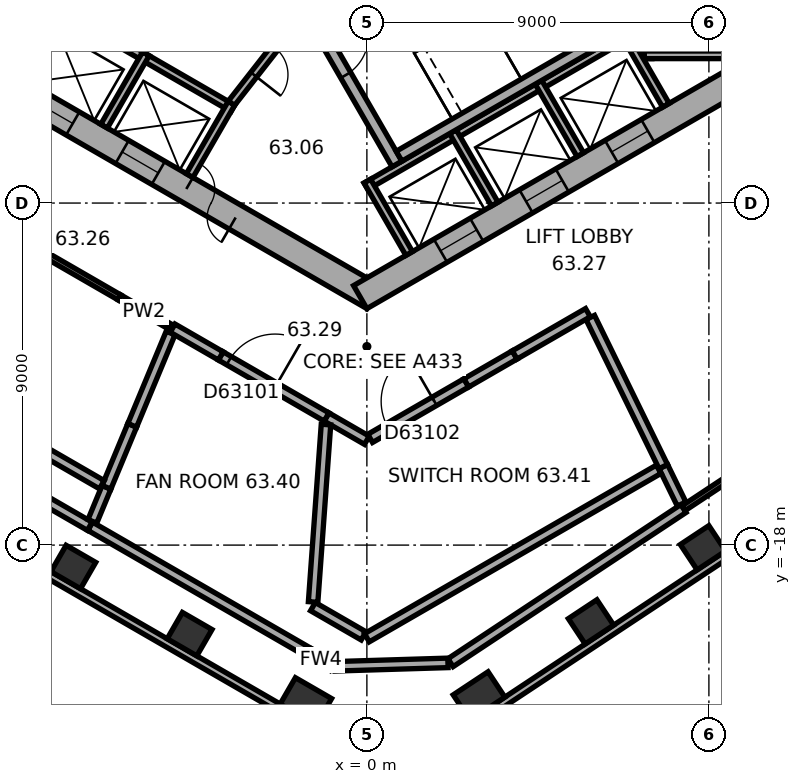
"""IFC4 building model, lengths in metres.
Left out: names, types, materials, properties, quantities, classifications, styles, units other than length and angle.
Written with IfcOpenShell. Run it as: python <this file> out.ifc"""

import sys

from ifc_helpers import new_model, si_unit, direction, frame, frame_2d, origin, origin_2d, place, context, subcontext, project, spatial, rectangle, extrude, element, fill, save


model = new_model("IFC4")
c1 = context("Model", 3, precision=1e-05, world=origin(), true_north=direction((0.0, 1.0)))
c2 = subcontext(c1, "Body", "Model", "MODEL_VIEW")
j1 = project(units=[si_unit("LENGTHUNIT", "METRE"), si_unit("PLANEANGLEUNIT", "RADIAN")], contexts=[c1])
p1 = place(None, origin())
s1 = spatial("IfcSite", under=j1, at=p1, CompositionType="ELEMENT")
p2 = place(p1, origin())
s2 = spatial("IfcBuilding", under=s1, at=p2, CompositionType="ELEMENT")
p3 = place(p2, frame((0.0, 0.0, 255.0)))
s3 = spatial("IfcBuildingStorey", under=s2, at=p3, CompositionType="ELEMENT", Elevation=255.0)
for number, where, z_axis, x_axis in (
    (1, (-7.725, -18.576, 0.0), (0.0, 0.0, 1.0), (0.866, -0.5, 0.0)),
    (2, (-4.665, -20.343, 0.0), (0.0, 0.0, 1.0), (0.866, -0.5, 0.0)),
):
    element("IfcColumn", number, at=place(p3, frame(where, z_axis=z_axis, x_axis=x_axis)), inside=s3, PredefinedType="COLUMN", context=c2, shape_type="SweptSolid", body=[
        extrude(rectangle(XDim=0.9, YDim=0.8, at=origin_2d()), origin(), (0.0, 0.0, 1.0), 4.8),
    ])
for number, where, z_axis, x_axis in (
    (3, (-1.604, -22.11, 0.0), (0.0, 0.0, 1.0), (0.866, -0.5, 0.0)),
    (4, (2.951, -21.971, 0.0), (0.0, 0.0, 1.0), (0.834, 0.552, 0.0)),
):
    element("IfcColumn", number, at=place(p3, frame(where, z_axis=z_axis, x_axis=x_axis)), inside=s3, PredefinedType="COLUMN", context=c2, shape_type="SweptSolid", body=[
        extrude(rectangle(XDim=1.1, YDim=0.8, at=origin_2d()), origin(), (0.0, 0.0, 1.0), 4.8),
    ])
for number, where, z_axis, x_axis in (
    (5, (5.898, -20.021, 0.0), (0.0, 0.0, 1.0), (0.834, 0.552, 0.0)),
    (6, (8.844, -18.07, 0.0), (0.0, 0.0, 1.0), (0.834, 0.552, 0.0)),
):
    element("IfcColumn", number, at=place(p3, frame(where, z_axis=z_axis, x_axis=x_axis)), inside=s3, PredefinedType="COLUMN", context=c2, shape_type="SweptSolid", body=[
        extrude(rectangle(XDim=0.9, YDim=0.8, at=origin_2d()), origin(), (0.0, 0.0, 1.0), 4.8),
    ])
p4 = place(p3, frame((-10.025, -5.586, 0.0), z_axis=(0.0, 0.0, 1.0), x_axis=(0.866026453023, -0.499998182661, 0.0)))
e7 = element("IfcWall", 7, at=p4, inside=s3, PredefinedType="SHEAR", context=c2, shape_type="SweptSolid", body=[
    extrude(rectangle(XDim=11.778, YDim=0.7, at=frame_2d((5.889, 0.0))), origin(), (0.0, 0.0, 1.0), 4.8),
])
p5 = place(p4, frame((6.089, 0.0, 0.0)))
e8 = element("IfcOpeningElement", 8, at=p5, cuts=e7, PredefinedType="OPENING", context=c2, shape_type="SweptSolid", body=[
    extrude(rectangle(XDim=1.5, YDim=2.1, at=frame_2d((0.75, 1.05))), frame((0.0, 0.36, 0.0), z_axis=(0.0, -1.0, 0.0), x_axis=(1.0, 0.0, 0.0)), (0.0, 0.0, 1.0), 0.72),
])
p6 = place(p4, frame((1.539, 0.0, 0.0)))
e9 = element("IfcOpeningElement", 9, at=p6, cuts=e7, PredefinedType="OPENING", context=c2, shape_type="SweptSolid", body=[
    extrude(rectangle(XDim=1.1, YDim=2.1, at=frame_2d((0.55, 1.05))), frame((0.0, 0.36, 0.0), z_axis=(0.0, -1.0, 0.0), x_axis=(1.0, 0.0, 0.0)), (0.0, 0.0, 1.0), 0.72),
])
p7 = place(p4, frame((4.139, 0.0, 0.0)))
e10 = element("IfcOpeningElement", 10, at=p7, cuts=e7, PredefinedType="OPENING", context=c2, shape_type="SweptSolid", body=[
    extrude(rectangle(XDim=1.1, YDim=2.1, at=frame_2d((0.55, 1.05))), frame((0.0, 0.36, 0.0), z_axis=(0.0, -1.0, 0.0), x_axis=(1.0, 0.0, 0.0)), (0.0, 0.0, 1.0), 0.72),
])
p8 = place(p3, frame((-0.175, -11.475, 0.0), z_axis=(0.0, 0.0, 1.0), x_axis=(0.866026453023, 0.499998182661, 0.0)))
e11 = element("IfcWall", 11, at=p8, inside=s3, PredefinedType="SHEAR", context=c2, shape_type="SweptSolid", body=[
    extrude(rectangle(XDim=11.778, YDim=0.7, at=frame_2d((5.889, 0.0))), origin(), (0.0, 0.0, 1.0), 4.8),
])
p9 = place(p8, frame((2.439, 0.0, 0.0)))
e12 = element("IfcOpeningElement", 12, at=p9, cuts=e11, PredefinedType="OPENING", context=c2, shape_type="SweptSolid", body=[
    extrude(rectangle(XDim=1.1, YDim=2.1, at=frame_2d((0.55, 1.05))), frame((0.0, 0.36, 0.0), z_axis=(0.0, -1.0, 0.0), x_axis=(1.0, 0.0, 0.0)), (0.0, 0.0, 1.0), 0.72),
])
p10 = place(p8, frame((5.039, 0.0, 0.0)))
e13 = element("IfcOpeningElement", 13, at=p10, cuts=e11, PredefinedType="OPENING", context=c2, shape_type="SweptSolid", body=[
    extrude(rectangle(XDim=1.1, YDim=2.1, at=frame_2d((0.55, 1.05))), frame((0.0, 0.36, 0.0), z_axis=(0.0, -1.0, 0.0), x_axis=(1.0, 0.0, 0.0)), (0.0, 0.0, 1.0), 0.72),
])
p11 = place(p8, frame((7.639, 0.0, 0.0)))
e14 = element("IfcOpeningElement", 14, at=p11, cuts=e11, PredefinedType="OPENING", context=c2, shape_type="SweptSolid", body=[
    extrude(rectangle(XDim=1.1, YDim=2.1, at=frame_2d((0.55, 1.05))), frame((0.0, 0.36, 0.0), z_axis=(0.0, -1.0, 0.0), x_axis=(1.0, 0.0, 0.0)), (0.0, 0.0, 1.0), 0.72),
])
for number, where, z_axis, x_axis in (
    (15, (-17.664, -13.415, 0.0), (0.0, 0.0, 1.0), (0.866, -0.5, 0.0)),
    (16, (2.739, -22.711, 0.0), (0.0, 0.0, 1.0), (0.834, 0.552, 0.0)),
):
    element("IfcWall", number, at=place(p3, frame(where, z_axis=z_axis, x_axis=x_axis)), inside=s3, PredefinedType="STANDARD", context=c2, shape_type="SweptSolid", body=[
        extrude(rectangle(XDim=18.841, YDim=0.2, at=frame_2d((9.421, 0.0))), origin(), (0.0, 0.0, 1.0), 4.8),
    ])
p12 = place(p3, frame((7.4, -5.2, 0.0), z_axis=(0.0, 0.0, 1.0), x_axis=(0.0, 1.0, 0.0)))
e17 = element("IfcWall", 17, at=p12, inside=s3, PredefinedType="PARTITIONING", context=c2, shape_type="SweptSolid", body=[
    extrude(rectangle(XDim=5.4, YDim=0.2, at=frame_2d((2.7, 0.0))), origin(), (0.0, 0.0, 1.0), 4.52),
])
p13 = place(p3, frame((7.3, -5.1, 0.0), z_axis=(0.0, 0.0, 1.0), x_axis=(1.0, 0.0, 0.0)))
e18 = element("IfcWall", 18, at=p13, inside=s3, PredefinedType="PARTITIONING", context=c2, shape_type="SweptSolid", body=[
    extrude(rectangle(XDim=2.2, YDim=0.2, at=frame_2d((1.1, 0.0))), origin(), (0.0, 0.0, 1.0), 4.52),
])
p14 = place(p3, frame((-8.203, -3.809, 0.0), z_axis=(0.0, 0.0, 1.0), x_axis=(0.866028230842, -0.499995103361, 0.0)))
e19 = element("IfcWall", 19, at=p14, inside=s3, PredefinedType="PARTITIONING", context=c2, shape_type="SweptSolid", body=[
    extrude(rectangle(XDim=5.4, YDim=0.2, at=frame_2d((2.7, 0.0))), origin(), (0.0, 0.0, 1.0), 4.52),
])
for number, where, z_axis, x_axis in (
    (20, (-8.067, -3.772, 0.0), (0.0, 0.0, 1.0), (-0.5, -0.866, 0.0)),
    (21, (-5.815, -5.072, 0.0), (0.0, 0.0, 1.0), (-0.5, -0.866, 0.0)),
):
    element("IfcWall", number, at=place(p3, frame(where, z_axis=z_axis, x_axis=x_axis)), inside=s3, PredefinedType="PARTITIONING", context=c2, shape_type="SweptSolid", body=[
        extrude(rectangle(XDim=2.2, YDim=0.2, at=frame_2d((1.1, 0.0))), origin(), (0.0, 0.0, 1.0), 4.52),
    ])
p15 = place(p3, frame((-3.563, -6.372, 0.0), z_axis=(0.0, 0.0, 1.0), x_axis=(-0.499994660107, -0.866028486751, 0.0)))
e22 = element("IfcWall", 22, at=p15, inside=s3, PredefinedType="PARTITIONING", context=c2, shape_type="SweptSolid", body=[
    extrude(rectangle(XDim=2.2, YDim=0.2, at=frame_2d((1.1, 0.0))), origin(), (0.0, 0.0, 1.0), 4.52),
])
p16 = place(p3, frame((-0.024, -8.559, 0.0), z_axis=(0.0, 0.0, 1.0), x_axis=(0.866026010844, 0.49999894854, 0.0)))
e23 = element("IfcWall", 23, at=p16, inside=s3, PredefinedType="PARTITIONING", context=c2, shape_type="SweptSolid", body=[
    extrude(rectangle(XDim=8.0, YDim=0.2, at=frame_2d((4.0, 0.0))), origin(), (0.0, 0.0, 1.0), 4.52),
])
for number, where, z_axis, x_axis in (
    (24, (0.013, -8.422, 0.0), (0.0, 0.0, 1.0), (0.5, -0.866, 0.0)),
    (25, (2.264, -7.122, 0.0), (0.0, 0.0, 1.0), (0.5, -0.866, 0.0)),
    (26, (4.516, -5.822, 0.0), (0.0, 0.0, 1.0), (0.5, -0.866, 0.0)),
    (27, (6.768, -4.522, 0.0), (0.0, 0.0, 1.0), (0.5, -0.866, 0.0)),
):
    element("IfcWall", number, at=place(p3, frame(where, z_axis=z_axis, x_axis=x_axis)), inside=s3, PredefinedType="PARTITIONING", context=c2, shape_type="SweptSolid", body=[
        extrude(rectangle(XDim=2.2, YDim=0.2, at=frame_2d((1.1, 0.0))), origin(), (0.0, 0.0, 1.0), 4.52),
    ])
p17 = place(p3, frame((-1.558, -3.902, 0.0), z_axis=(0.0, 0.0, 1.0), x_axis=(0.499977259774, -0.866038532462, 0.0)))
e28 = element("IfcWall", 28, at=p17, inside=s3, PredefinedType="SHEAR", context=c2, shape_type="SweptSolid", body=[
    extrude(rectangle(XDim=4.7, YDim=0.3, at=frame_2d((2.35, 0.0))), origin(), (0.0, 0.0, 1.0), 4.52),
])
p18 = place(p17, frame((0.8, 0.0, 0.0)))
e29 = element("IfcOpeningElement", 29, at=p18, cuts=e28, PredefinedType="OPENING", context=c2, shape_type="SweptSolid", body=[
    extrude(rectangle(XDim=1.2, YDim=2.1, at=frame_2d((0.6, 1.05))), frame((0.0, 0.16, 0.0), z_axis=(0.0, -1.0, 0.0), x_axis=(1.0, 0.0, 0.0)), (0.0, 0.0, 1.0), 0.32),
])
p19 = place(p3, frame((0.847, -7.767, 0.0), z_axis=(0.0, 0.0, 1.0), x_axis=(0.866027801685, 0.499995846692, 0.0)))
e30 = element("IfcWall", 30, at=p19, inside=s3, PredefinedType="SHEAR", context=c2, shape_type="SweptSolid", body=[
    extrude(rectangle(XDim=7.06, YDim=0.3, at=frame_2d((3.53, 0.0))), origin(), (0.0, 0.0, 1.0), 4.52),
])
p20 = place(p3, frame((-1.712, -4.008, 0.0), z_axis=(0.0, 0.0, 1.0), x_axis=(-0.616549420702, -0.787316208287, 0.0)))
e31 = element("IfcWall", 31, at=p20, inside=s3, PredefinedType="PARTITIONING", context=c2, shape_type="SweptSolid", body=[
    extrude(rectangle(XDim=3.002, YDim=0.2, at=frame_2d((1.501, 0.0))), origin(), (0.0, 0.0, 1.0), 4.52),
])
p21 = place(p20, frame((1.15, 0.0, 0.0)))
e32 = element("IfcOpeningElement", 32, at=p21, cuts=e31, PredefinedType="OPENING", context=c2, shape_type="SweptSolid", body=[
    extrude(rectangle(XDim=0.9, YDim=2.1, at=frame_2d((0.45, 1.05))), frame((0.0, 0.11, 0.0), z_axis=(0.0, -1.0, 0.0), x_axis=(1.0, 0.0, 0.0)), (0.0, 0.0, 1.0), 0.22),
])
p22 = place(p3, frame((-0.909, -21.189, 0.0), z_axis=(0.0, 0.0, 1.0), x_axis=(-0.866044773228, 0.499966449638, 0.0)))
e33 = element("IfcWall", 33, at=p22, inside=s3, PredefinedType="SOLIDWALL", context=c2, shape_type="SweptSolid", body=[
    extrude(rectangle(XDim=0.693, YDim=0.25, at=frame_2d((0.346, 0.0))), origin(), (0.0, 0.0, 1.0), 4.52),
])
p23 = place(p3, frame((2.133, -21.099, 0.0), z_axis=(0.0, 0.0, 1.0), x_axis=(-0.999534075992, -0.030522629804, 0.0)))
e34 = element("IfcWall", 34, at=p23, inside=s3, PredefinedType="SOLIDWALL", context=c2, shape_type="SweptSolid", body=[
    extrude(rectangle(XDim=2.976, YDim=0.25, at=frame_2d((1.488, 0.0))), origin(), (0.0, 0.0, 1.0), 4.52),
])
p24 = place(p3, frame((-1.517, -20.833, 0.0), z_axis=(0.0, 0.0, 1.0), x_axis=(-0.866015126836, 0.500017799774, 0.0)))
e35 = element("IfcWall", 35, at=p24, inside=s3, PredefinedType="SOLIDWALL", context=c2, shape_type="SweptSolid", body=[
    extrude(rectangle(XDim=6.655, YDim=0.25, at=frame_2d((3.327, 0.0))), origin(), (0.0, 0.0, 1.0), 4.02),
])
p25 = place(p3, frame((-0.087, -20.388, 0.0), z_axis=(0.0, 0.0, 1.0), x_axis=(-0.866116914727, 0.499841464891, 0.0)))
e36 = element("IfcWall", 36, at=p25, inside=s3, PredefinedType="SOLIDWALL", context=c2, shape_type="SweptSolid", body=[
    extrude(rectangle(XDim=1.539, YDim=0.25, at=frame_2d((0.77, 0.0))), origin(), (0.0, 0.0, 1.0), 4.52),
])
p26 = place(p3, frame((-7.292, -17.504, 0.0), z_axis=(0.0, 0.0, 1.0), x_axis=(-0.866024002353, 0.500002427343, 0.0)))
e37 = element("IfcWall", 37, at=p26, inside=s3, PredefinedType="SOLIDWALL", context=c2, shape_type="SweptSolid", body=[
    extrude(rectangle(XDim=9.964, YDim=0.25, at=frame_2d((4.982, 0.0))), origin(), (0.0, 0.0, 1.0), 4.02),
])
p27 = place(p3, frame((-7.223, -17.375, 0.0), z_axis=(0.0, 0.0, 1.0), x_axis=(0.382374085118, 0.924007607669, 0.0)))
e38 = element("IfcWall", 38, at=p27, inside=s3, PredefinedType="SOLIDWALL", context=c2, shape_type="SweptSolid", body=[
    extrude(rectangle(XDim=0.967, YDim=0.25, at=frame_2d((0.484, 0.0))), origin(), (0.0, 0.0, 1.0), 3.6),
])
p28 = place(p3, frame((8.33, -17.038, 0.0), z_axis=(0.0, 0.0, 1.0), x_axis=(-0.833910848154, -0.551899173156, 0.0)))
e39 = element("IfcWall", 39, at=p28, inside=s3, PredefinedType="SOLIDWALL", context=c2, shape_type="SweptSolid", body=[
    extrude(rectangle(XDim=7.35, YDim=0.25, at=frame_2d((3.675, 0.0))), origin(), (0.0, 0.0, 1.0), 4.02),
])
p29 = place(p3, frame((8.282, -16.921, 0.0), z_axis=(0.0, 0.0, 1.0), x_axis=(-0.438730750158, 0.898618566949, 0.0)))
e40 = element("IfcWall", 40, at=p29, inside=s3, PredefinedType="SOLIDWALL", context=c2, shape_type="SweptSolid", body=[
    extrude(rectangle(XDim=1.096, YDim=0.25, at=frame_2d((0.548, 0.0))), origin(), (0.0, 0.0, 1.0), 3.6),
])
p30 = place(p3, frame((-6.853, -16.479, 0.0), z_axis=(0.0, 0.0, 1.0), x_axis=(0.38378052161, 0.923424339745, 0.0)))
e41 = element("IfcWall", 41, at=p30, inside=s3, PredefinedType="SOLIDWALL", context=c2, shape_type="SweptSolid", body=[
    extrude(rectangle(XDim=1.765, YDim=0.25, at=frame_2d((0.883, 0.0))), origin(), (0.0, 0.0, 1.0), 3.6),
])
p31 = place(p3, frame((-6.975, -16.411, 0.0), z_axis=(0.0, 0.0, 1.0), x_axis=(-0.866045613381, 0.499964994319, 0.0)))
e42 = element("IfcWall", 42, at=p31, inside=s3, PredefinedType="SOLIDWALL", context=c2, shape_type="SweptSolid", body=[
    extrude(rectangle(XDim=9.265, YDim=0.25, at=frame_2d((4.633, 0.0))), origin(), (0.0, 0.0, 1.0), 4.52),
])
p32 = place(p3, frame((7.678, -16.005, 0.0), z_axis=(0.0, 0.0, 1.0), x_axis=(-0.866021420858, -0.500006898567, 0.0)))
e43 = element("IfcWall", 43, at=p32, inside=s3, PredefinedType="SOLIDWALL", context=c2, shape_type="SweptSolid", body=[
    extrude(rectangle(XDim=8.866, YDim=0.25, at=frame_2d((4.433, 0.0))), origin(), (0.0, 0.0, 1.0), 4.52),
])
p33 = place(p3, frame((7.799, -15.934, 0.0), z_axis=(0.0, 0.0, 1.0), x_axis=(-0.439688100098, 0.898150530052, 0.0)))
e44 = element("IfcWall", 44, at=p33, inside=s3, PredefinedType="SOLIDWALL", context=c2, shape_type="SweptSolid", body=[
    extrude(rectangle(XDim=4.369, YDim=0.25, at=frame_2d((2.185, 0.0))), origin(), (0.0, 0.0, 1.0), 3.6),
])
p34 = place(p3, frame((0.0, -15.242, 0.0), z_axis=(0.0, 0.0, 1.0), x_axis=(-0.866052913447, 0.499952348839, 0.0)))
e45 = element("IfcWall", 45, at=p34, inside=s3, PredefinedType="SOLIDWALL", context=c2, shape_type="SweptSolid", body=[
    extrude(rectangle(XDim=1.226, YDim=0.25, at=frame_2d((0.613, 0.0))), origin(), (0.0, 0.0, 1.0), 4.52),
])
p35 = place(p3, frame((-6.175, -14.848, 0.0), z_axis=(0.0, 0.0, 1.0), x_axis=(0.383969284398, 0.923345866205, 0.0)))
e46 = element("IfcWall", 46, at=p35, inside=s3, PredefinedType="SOLIDWALL", context=c2, shape_type="SweptSolid", body=[
    extrude(rectangle(XDim=2.63, YDim=0.25, at=frame_2d((1.315, 0.0))), origin(), (0.0, 0.0, 1.0), 3.6),
])
p36 = place(p3, frame((-1.076, -14.829, 0.0), z_axis=(0.0, 0.0, 1.0), x_axis=(-0.072399845952, -0.997375687645, 0.0)))
e47 = element("IfcWall", 47, at=p36, inside=s3, PredefinedType="SOLIDWALL", context=c2, shape_type="SweptSolid", body=[
    extrude(rectangle(XDim=4.68, YDim=0.25, at=frame_2d((2.34, 0.0))), origin(), (0.0, 0.0, 1.0), 3.6),
])
p37 = place(p3, frame((-1.062, -14.629, 0.0), z_axis=(0.0, 0.0, 1.0), x_axis=(-0.866018596809, 0.500011789842, 0.0)))
e48 = element("IfcWall", 48, at=p37, inside=s3, PredefinedType="SOLIDWALL", context=c2, shape_type="SweptSolid", body=[
    extrude(rectangle(XDim=3.214, YDim=0.25, at=frame_2d((1.607, 0.0))), origin(), (0.0, 0.0, 1.0), 4.52),
])
p38 = place(p37, frame((1.564, 0.0, 0.0)))
e49 = element("IfcOpeningElement", 49, at=p38, cuts=e48, PredefinedType="OPENING", context=c2, shape_type="SweptSolid", body=[
    extrude(rectangle(XDim=1.4, YDim=2.1, at=frame_2d((0.7, 1.05))), frame((0.0, 0.135, 0.0), z_axis=(0.0, -1.0, 0.0), x_axis=(1.0, 0.0, 0.0)), (0.0, 0.0, 1.0), 0.27),
])
p39 = place(p3, frame((2.616, -13.731, 0.0), z_axis=(0.0, 0.0, 1.0), x_axis=(-0.866043624834, -0.499968438888, 0.0)))
e50 = element("IfcWall", 50, at=p39, inside=s3, PredefinedType="SOLIDWALL", context=c2, shape_type="SweptSolid", body=[
    extrude(rectangle(XDim=2.921, YDim=0.25, at=frame_2d((1.46, 0.0))), origin(), (0.0, 0.0, 1.0), 4.52),
])
p40 = place(p39, frame((0.971, 0.0, 0.0)))
e51 = element("IfcOpeningElement", 51, at=p40, cuts=e50, PredefinedType="OPENING", context=c2, shape_type="SweptSolid", body=[
    extrude(rectangle(XDim=1.4, YDim=2.1, at=frame_2d((0.7, 1.05))), frame((0.0, 0.135, 0.0), z_axis=(0.0, -1.0, 0.0), x_axis=(1.0, 0.0, 0.0)), (0.0, 0.0, 1.0), 0.27),
])
p41 = place(p3, frame((2.616, -13.731, 0.0), z_axis=(0.0, 0.0, 1.0), x_axis=(0.866047289552, 0.499962090823, 0.0)))
e52 = element("IfcWall", 52, at=p41, inside=s3, PredefinedType="SOLIDWALL", context=c2, shape_type="SweptSolid", body=[
    extrude(rectangle(XDim=1.47, YDim=0.25, at=frame_2d((0.735, 0.0))), origin(), (0.0, 0.0, 1.0), 4.52),
])
p42 = place(p3, frame((-3.845, -13.022, 0.0), z_axis=(0.0, 0.0, 1.0), x_axis=(-0.866088314402, 0.499891019779, 0.0)))
e53 = element("IfcWall", 53, at=p42, inside=s3, PredefinedType="SOLIDWALL", context=c2, shape_type="SweptSolid", body=[
    extrude(rectangle(XDim=1.463, YDim=0.25, at=frame_2d((0.731, 0.0))), origin(), (0.0, 0.0, 1.0), 4.52),
])
p43 = place(p3, frame((3.889, -12.997, 0.0), z_axis=(0.0, 0.0, 1.0), x_axis=(0.866026623601, 0.49999788721, 0.0)))
e54 = element("IfcWall", 54, at=p43, inside=s3, PredefinedType="SOLIDWALL", context=c2, shape_type="SweptSolid", body=[
    extrude(rectangle(XDim=2.225, YDim=0.25, at=frame_2d((1.113, 0.0))), origin(), (0.0, 0.0, 1.0), 4.52),
])
p44 = place(p3, frame((-6.513, -11.481, 0.0), z_axis=(0.0, 0.0, 1.0), x_axis=(0.866009279501, -0.500027927039, 0.0)))
e55 = element("IfcWall", 55, at=p44, inside=s3, PredefinedType="PARTITIONING", context=c2, shape_type="SweptSolid", body=[
    extrude(rectangle(XDim=1.499, YDim=0.15, at=frame_2d((0.75, 0.0))), origin(), (0.0, 0.0, 1.0), 4.52),
])
p45 = place(p3, frame((17.215, -11.151, 0.0), z_axis=(0.0, 0.0, 1.0), x_axis=(-0.833876794276, -0.551950624575, 0.0)))
e56 = element("IfcWall", 56, at=p45, inside=s3, PredefinedType="PARTITIONING", context=c2, shape_type="SweptSolid", body=[
    extrude(rectangle(XDim=10.646, YDim=0.15, at=frame_2d((5.323, 0.0))), origin(), (0.0, 0.0, 1.0), 4.02),
])
p46 = place(p3, frame((-11.186, -8.784, 0.0), z_axis=(0.0, 0.0, 1.0), x_axis=(0.866020546064, -0.500008413725, 0.0)))
e57 = element("IfcWall", 57, at=p46, inside=s3, PredefinedType="PARTITIONING", context=c2, shape_type="SweptSolid", body=[
    extrude(rectangle(XDim=5.395, YDim=0.15, at=frame_2d((2.698, 0.0))), origin(), (0.0, 0.0, 1.0), 4.52),
])
p47 = place(p46, frame((0.25, 0.0, 0.0)))
e58 = element("IfcOpeningElement", 58, at=p47, cuts=e57, PredefinedType="OPENING", context=c2, shape_type="SweptSolid", body=[
    extrude(rectangle(XDim=1.0, YDim=2.1, at=frame_2d((0.5, 1.05))), frame((0.0, 0.085, 0.0), z_axis=(0.0, -1.0, 0.0), x_axis=(1.0, 0.0, 0.0)), (0.0, 0.0, 1.0), 0.17),
])
p48 = place(p5, origin())
e59 = element("IfcDoor", 59, at=p48, inside=s3, OperationType="DOUBLE_DOOR_SINGLE_SWING", PredefinedType="DOOR", context=c2, shape_type="SweptSolid", body=[
    extrude(rectangle(XDim=1.5, YDim=2.1, at=frame_2d((0.75, 1.05))), frame((0.0, 0.025, 0.0), z_axis=(0.0, -1.0, 0.0), x_axis=(1.0, 0.0, 0.0)), (0.0, 0.0, 1.0), 0.05),
])
fill(e8, e59)
p49 = place(p18, origin())
e60 = element("IfcDoor", 60, at=p49, inside=s3, OperationType="SINGLE_SWING_RIGHT", PredefinedType="DOOR", context=c2, shape_type="SweptSolid", body=[
    extrude(rectangle(XDim=1.2, YDim=2.1, at=frame_2d((0.6, 1.05))), frame((0.0, 0.025, 0.0), z_axis=(0.0, -1.0, 0.0), x_axis=(1.0, 0.0, 0.0)), (0.0, 0.0, 1.0), 0.05),
])
fill(e29, e60)
p50 = place(p21, origin())
e61 = element("IfcDoor", 61, at=p50, inside=s3, OperationType="SINGLE_SWING_LEFT", PredefinedType="DOOR", context=c2, shape_type="SweptSolid", body=[
    extrude(rectangle(XDim=0.9, YDim=2.1, at=frame_2d((0.45, 1.05))), frame((0.0, 0.025, 0.0), z_axis=(0.0, -1.0, 0.0), x_axis=(1.0, 0.0, 0.0)), (0.0, 0.0, 1.0), 0.05),
])
fill(e32, e61)
p51 = place(p6, origin())
e62 = element("IfcDoor", 62, at=p51, inside=s3, OperationType="DOUBLE_DOOR_SLIDING", PredefinedType="DOOR", context=c2, shape_type="SweptSolid", body=[
    extrude(rectangle(XDim=1.1, YDim=2.1, at=frame_2d((0.55, 1.05))), frame((0.0, 0.025, 0.0), z_axis=(0.0, -1.0, 0.0), x_axis=(1.0, 0.0, 0.0)), (0.0, 0.0, 1.0), 0.05),
])
fill(e9, e62)
p52 = place(p7, origin())
e63 = element("IfcDoor", 63, at=p52, inside=s3, OperationType="DOUBLE_DOOR_SLIDING", PredefinedType="DOOR", context=c2, shape_type="SweptSolid", body=[
    extrude(rectangle(XDim=1.1, YDim=2.1, at=frame_2d((0.55, 1.05))), frame((0.0, 0.025, 0.0), z_axis=(0.0, -1.0, 0.0), x_axis=(1.0, 0.0, 0.0)), (0.0, 0.0, 1.0), 0.05),
])
fill(e10, e63)
p53 = place(p9, origin())
e64 = element("IfcDoor", 64, at=p53, inside=s3, OperationType="DOUBLE_DOOR_SLIDING", PredefinedType="DOOR", context=c2, shape_type="SweptSolid", body=[
    extrude(rectangle(XDim=1.1, YDim=2.1, at=frame_2d((0.55, 1.05))), frame((0.0, 0.025, 0.0), z_axis=(0.0, -1.0, 0.0), x_axis=(1.0, 0.0, 0.0)), (0.0, 0.0, 1.0), 0.05),
])
fill(e12, e64)
p54 = place(p10, origin())
e65 = element("IfcDoor", 65, at=p54, inside=s3, OperationType="DOUBLE_DOOR_SLIDING", PredefinedType="DOOR", context=c2, shape_type="SweptSolid", body=[
    extrude(rectangle(XDim=1.1, YDim=2.1, at=frame_2d((0.55, 1.05))), frame((0.0, 0.025, 0.0), z_axis=(0.0, -1.0, 0.0), x_axis=(1.0, 0.0, 0.0)), (0.0, 0.0, 1.0), 0.05),
])
fill(e13, e65)
p55 = place(p11, origin())
e66 = element("IfcDoor", 66, at=p55, inside=s3, OperationType="DOUBLE_DOOR_SLIDING", PredefinedType="DOOR", context=c2, shape_type="SweptSolid", body=[
    extrude(rectangle(XDim=1.1, YDim=2.1, at=frame_2d((0.55, 1.05))), frame((0.0, 0.025, 0.0), z_axis=(0.0, -1.0, 0.0), x_axis=(1.0, 0.0, 0.0)), (0.0, 0.0, 1.0), 0.05),
])
fill(e14, e66)
p56 = place(p38, origin())
e67 = element("IfcDoor", 67, at=p56, inside=s3, OperationType="SINGLE_SWING_LEFT", PredefinedType="DOOR", context=c2, shape_type="SweptSolid", body=[
    extrude(rectangle(XDim=1.4, YDim=2.1, at=frame_2d((0.7, 1.05))), frame((0.0, 0.025, 0.0), z_axis=(0.0, -1.0, 0.0), x_axis=(1.0, 0.0, 0.0)), (0.0, 0.0, 1.0), 0.05),
])
fill(e49, e67)
p57 = place(p40, origin())
e68 = element("IfcDoor", 68, at=p57, inside=s3, OperationType="SINGLE_SWING_LEFT", PredefinedType="DOOR", context=c2, shape_type="SweptSolid", body=[
    extrude(rectangle(XDim=1.4, YDim=2.1, at=frame_2d((0.7, 1.05))), frame((0.0, 0.025, 0.0), z_axis=(0.0, -1.0, 0.0), x_axis=(1.0, 0.0, 0.0)), (0.0, 0.0, 1.0), 0.05),
])
fill(e51, e68)
save(model, sys.argv[1])
